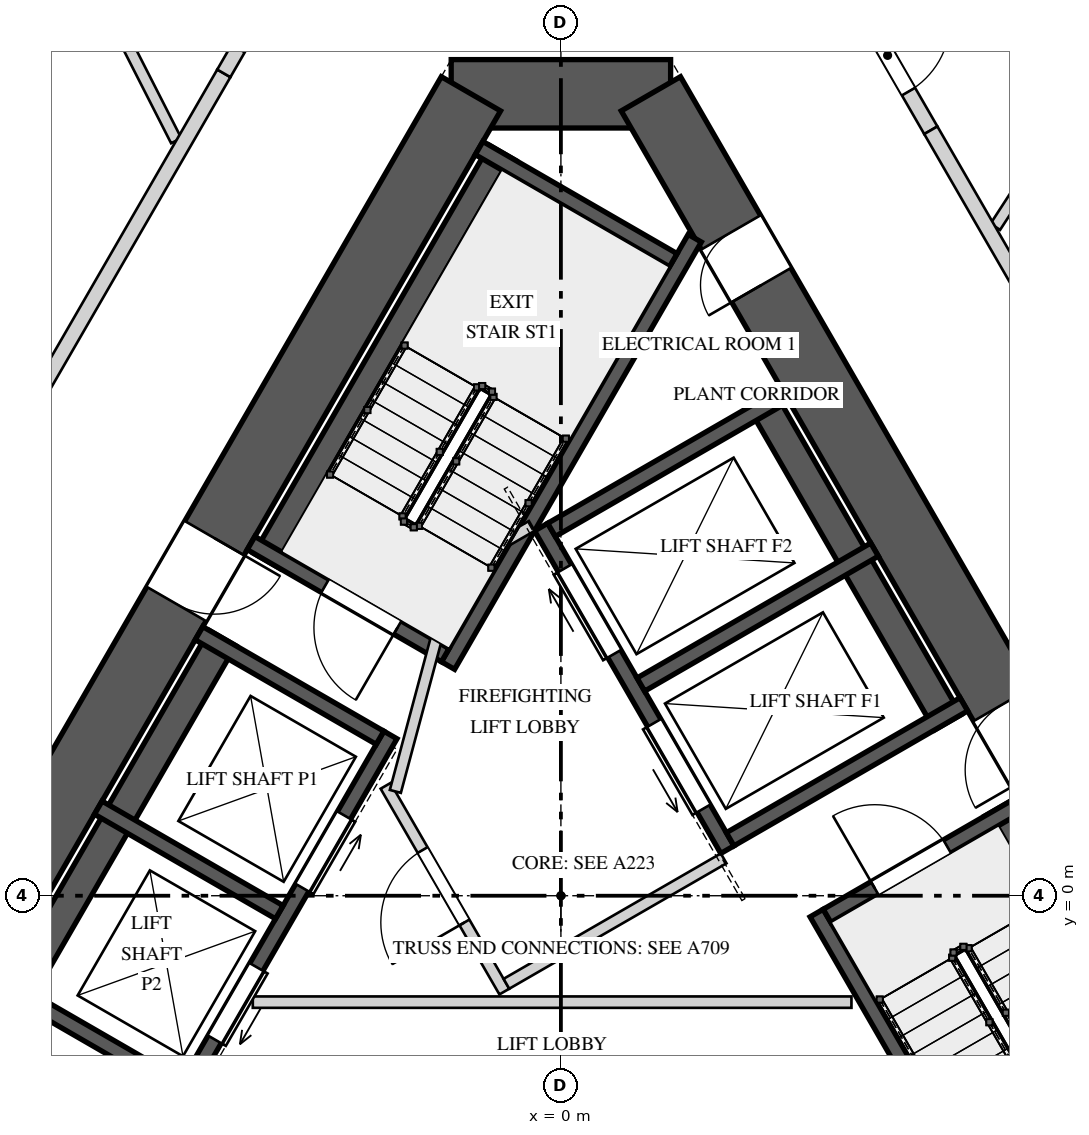
"""IFC4 building model, lengths in metres.
Left out: names, types, materials, properties, quantities, classifications, styles, units other than length and angle.
Written with IfcOpenShell. Run it as: python <this file> out.ifc"""

import sys

from ifc_helpers import new_model, si_unit, direction, frame, frame_2d, origin, place, context, subcontext, project, spatial, polyline, rectangle, outline, extrude, element, fill, save


model = new_model("IFC4")
c1 = context("Model", 3, precision=1e-05, world=origin(), true_north=direction((0.0, 1.0)))
c2 = subcontext(c1, "Body", "Model", "MODEL_VIEW")
j1 = project(units=[si_unit("LENGTHUNIT", "METRE"), si_unit("PLANEANGLEUNIT", "RADIAN")], contexts=[c1])
p1 = place(None, origin())
s1 = spatial("IfcSite", under=j1, at=p1, CompositionType="ELEMENT")
p2 = place(p1, origin())
s2 = spatial("IfcBuilding", under=s1, at=p2, CompositionType="ELEMENT")
p3 = place(p2, frame((0.0, 0.0, 157.6)))
s3 = spatial("IfcBuildingStorey", under=s2, at=p3, CompositionType="ELEMENT", Elevation=157.6)
p4 = place(p3, frame((1.443, 10.55, 0.0), z_axis=(0.0, 0.0, 1.0), x_axis=(-1.0, 0.0, 0.0)))
e1 = element("IfcWall", 1, at=p4, inside=s3, PredefinedType="SHEAR", context=c2, shape_type="SweptSolid", body=[
    extrude(rectangle(XDim=2.887, YDim=0.9, at=frame_2d((1.443, 0.0))), origin(), (0.0, 0.0, 1.0), 5.2),
])
p5 = place(p3, frame((-1.184, 10.55, 0.0), z_axis=(0.0, 0.0, 1.0), x_axis=(-0.500004814304, -0.866022624227, 0.0)))
e2 = element("IfcWall", 2, at=p5, inside=s3, PredefinedType="SHEAR", context=c2, shape_type="SweptSolid", body=[
    extrude(rectangle(XDim=17.09, YDim=0.9, at=frame_2d((8.545, 0.0))), origin(), (0.0, 0.0, 1.0), 5.2),
])
p6 = place(p5, frame((6.75, 0.0, 0.0)))
e3 = element("IfcOpeningElement", 3, at=p6, cuts=e2, PredefinedType="OPENING", context=c2, shape_type="SweptSolid", body=[
    extrude(rectangle(XDim=1.0, YDim=2.4, at=frame_2d((0.5, 1.2))), frame((0.0, 0.46, 0.0), z_axis=(0.0, -1.0, 0.0), x_axis=(1.0, 0.0, 0.0)), (0.0, 0.0, 1.0), 0.92),
])
p7 = place(p3, frame((9.729, -4.25, 0.0), z_axis=(0.0, 0.0, 1.0), x_axis=(-0.500004814304, 0.866022624227, 0.0)))
e4 = element("IfcWall", 4, at=p7, inside=s3, PredefinedType="SHEAR", context=c2, shape_type="SweptSolid", body=[
    extrude(rectangle(XDim=17.09, YDim=0.9, at=frame_2d((8.545, 0.0))), origin(), (0.0, 0.0, 1.0), 5.2),
])
p8 = place(p7, frame((6.82, 0.0, 0.0)))
e5 = element("IfcOpeningElement", 5, at=p8, cuts=e4, PredefinedType="OPENING", context=c2, shape_type="SweptSolid", body=[
    extrude(rectangle(XDim=1.0, YDim=2.4, at=frame_2d((0.5, 1.2))), frame((0.0, 0.46, 0.0), z_axis=(0.0, -1.0, 0.0), x_axis=(1.0, 0.0, 0.0)), (0.0, 0.0, 1.0), 0.92),
])
p9 = place(p7, frame((14.184, 0.0, 0.0)))
e6 = element("IfcOpeningElement", 6, at=p9, cuts=e4, PredefinedType="OPENING", context=c2, shape_type="SweptSolid", body=[
    extrude(rectangle(XDim=0.8, YDim=2.1, at=frame_2d((0.4, 1.05))), frame((0.0, 0.46, 0.0), z_axis=(0.0, -1.0, 0.0), x_axis=(1.0, 0.0, 0.0)), (0.0, 0.0, 1.0), 0.92),
])
p10 = place(p3, frame((-0.766, 9.772, 0.0), z_axis=(0.0, 0.0, 1.0), x_axis=(-0.500009909098, -0.866019682689, 0.0)))
e7 = element("IfcWall", 7, at=p10, inside=s3, PredefinedType="SOLIDWALL", context=c2, shape_type="SweptSolid", body=[
    extrude(rectangle(XDim=6.2, YDim=0.4, at=frame_2d((3.1, 0.0))), origin(), (0.0, 0.0, 1.0), 4.85),
])
p11 = place(p3, frame((1.761, 8.65, 0.0), z_axis=(0.0, 0.0, 1.0), x_axis=(-0.500010023241, -0.866019616786, 0.0)))
e8 = element("IfcWall", 8, at=p11, inside=s3, PredefinedType="SOLIDWALL", context=c2, shape_type="SweptSolid", body=[
    extrude(rectangle(XDim=6.491, YDim=0.2, at=frame_2d((3.246, 0.0))), origin(), (0.0, 0.0, 1.0), 4.85),
])
p12 = place(p3, frame((1.479, 8.361, 0.0), z_axis=(0.0, 0.0, 1.0), x_axis=(-0.866003658127, 0.500037662692, 0.0)))
e9 = element("IfcWall", 9, at=p12, inside=s3, PredefinedType="SOLIDWALL", context=c2, shape_type="SweptSolid", body=[
    extrude(rectangle(XDim=2.95, YDim=0.2, at=frame_2d((1.475, 0.0))), origin(), (0.0, 0.0, 1.0), 4.85),
])
p13 = place(p3, frame((-1.521, 3.165, 0.0), z_axis=(0.0, 0.0, 1.0), x_axis=(-0.866039495442, 0.49997559174, 0.0)))
e10 = element("IfcWall", 10, at=p13, inside=s3, PredefinedType="SOLIDWALL", context=c2, shape_type="SweptSolid", body=[
    extrude(rectangle(XDim=2.95, YDim=0.2, at=frame_2d((1.475, 0.0))), origin(), (0.0, 0.0, 1.0), 4.85),
])
p14 = place(p13, frame((0.725, 0.0, 0.0)))
e11 = element("IfcOpeningElement", 11, at=p14, cuts=e10, PredefinedType="OPENING", context=c2, shape_type="SweptSolid", body=[
    extrude(rectangle(XDim=1.1, YDim=2.4, at=frame_2d((0.55, 1.2))), frame((0.0, 0.11, 0.0), z_axis=(0.0, -1.0, 0.0), x_axis=(1.0, 0.0, 0.0)), (0.0, 0.0, 1.0), 0.22),
])
p15 = place(p3, frame((8.846, -4.222, 0.0), z_axis=(0.0, 0.0, 1.0), x_axis=(-0.500009909098, 0.866019682689, 0.0)))
e12 = element("IfcWall", 12, at=p15, inside=s3, PredefinedType="SOLIDWALL", context=c2, shape_type="SweptSolid", body=[
    extrude(rectangle(XDim=6.2, YDim=0.4, at=frame_2d((3.1, 0.0))), origin(), (0.0, 0.0, 1.0), 4.85),
])
p16 = place(p3, frame((6.611, -5.85, 0.0), z_axis=(0.0, 0.0, 1.0), x_axis=(-0.499965531574, 0.866045303225, 0.0)))
e13 = element("IfcWall", 13, at=p16, inside=s3, PredefinedType="SOLIDWALL", context=c2, shape_type="SweptSolid", body=[
    extrude(rectangle(XDim=6.492, YDim=0.2, at=frame_2d((3.246, 0.0))), origin(), (0.0, 0.0, 1.0), 4.85),
])
p17 = place(p3, frame((3.501, -0.265, 0.0), z_axis=(0.0, 0.0, 1.0), x_axis=(0.866039495442, 0.49997559174, 0.0)))
e14 = element("IfcWall", 14, at=p17, inside=s3, PredefinedType="SOLIDWALL", context=c2, shape_type="SweptSolid", body=[
    extrude(rectangle(XDim=2.95, YDim=0.2, at=frame_2d((1.475, 0.0))), origin(), (0.0, 0.0, 1.0), 4.85),
])
p18 = place(p17, frame((0.725, 0.0, 0.0)))
e15 = element("IfcOpeningElement", 15, at=p18, cuts=e14, PredefinedType="OPENING", context=c2, shape_type="SweptSolid", body=[
    extrude(rectangle(XDim=1.1, YDim=2.4, at=frame_2d((0.55, 1.2))), frame((0.0, 0.11, 0.0), z_axis=(0.0, -1.0, 0.0), x_axis=(1.0, 0.0, 0.0)), (0.0, 0.0, 1.0), 0.22),
])
p19 = place(p3, frame((-2.243, 2.115, 0.0), z_axis=(0.0, 0.0, 1.0), x_axis=(-0.499996545922, -0.866027397988, 0.0)))
e16 = element("IfcWall", 16, at=p19, inside=s3, PredefinedType="SOLIDWALL", context=c2, shape_type="SweptSolid", body=[
    extrude(rectangle(XDim=5.5, YDim=0.2, at=frame_2d((2.75, 0.0))), origin(), (0.0, 0.0, 1.0), 4.85),
])
p20 = place(p19, frame((1.22, 0.0, 0.0)))
e17 = element("IfcOpeningElement", 17, at=p20, cuts=e16, PredefinedType="OPENING", context=c2, shape_type="SweptSolid", body=[
    extrude(rectangle(XDim=1.1, YDim=2.1, at=frame_2d((0.55, 1.05))), frame((0.0, 0.11, 0.0), z_axis=(0.0, -1.0, 0.0), x_axis=(1.0, 0.0, 0.0)), (0.0, 0.0, 1.0), 0.22),
])
p21 = place(p19, frame((3.525, 0.0, 0.0)))
e18 = element("IfcOpeningElement", 18, at=p21, cuts=e16, PredefinedType="OPENING", context=c2, shape_type="SweptSolid", body=[
    extrude(rectangle(XDim=1.1, YDim=2.1, at=frame_2d((0.55, 1.05))), frame((0.0, 0.11, 0.0), z_axis=(0.0, -1.0, 0.0), x_axis=(1.0, 0.0, 0.0)), (0.0, 0.0, 1.0), 0.22),
])
p22 = place(p3, frame((-4.451, 3.39, 0.0), z_axis=(0.0, 0.0, 1.0), x_axis=(-0.499996545922, -0.866027397988, 0.0)))
e19 = element("IfcWall", 19, at=p22, inside=s3, PredefinedType="SOLIDWALL", context=c2, shape_type="SweptSolid", body=[
    extrude(rectangle(XDim=5.5, YDim=0.4, at=frame_2d((2.75, 0.0))), origin(), (0.0, 0.0, 1.0), 4.85),
])
for number, where, z_axis, x_axis in (
    (20, (-2.38, 2.078, 0.0), (0.0, 0.0, 1.0), (-0.866, 0.5, 0.0)),
    (21, (-3.705, -0.217, 0.0), (0.0, 0.0, 1.0), (-0.866, 0.5, 0.0)),
):
    element("IfcWall", number, at=place(p3, frame(where, z_axis=z_axis, x_axis=x_axis)), inside=s3, PredefinedType="SOLIDWALL", context=c2, shape_type="SweptSolid", body=[
        extrude(rectangle(XDim=2.75, YDim=0.2, at=frame_2d((1.375, 0.0))), origin(), (0.0, 0.0, 1.0), 4.85),
    ])
p23 = place(p3, frame((-5.03, -2.512, 0.0), z_axis=(0.0, 0.0, 1.0), x_axis=(-0.866005201286, 0.500034990121, 0.0)))
e22 = element("IfcWall", 22, at=p23, inside=s3, PredefinedType="SOLIDWALL", context=c2, shape_type="SweptSolid", body=[
    extrude(rectangle(XDim=2.75, YDim=0.2, at=frame_2d((1.375, 0.0))), origin(), (0.0, 0.0, 1.0), 4.85),
])
p24 = place(p3, frame((2.19, 0.606, 0.0), z_axis=(0.0, 0.0, 1.0), x_axis=(-0.500002801628, 0.866023786258, 0.0)))
e23 = element("IfcWall", 23, at=p24, inside=s3, PredefinedType="SOLIDWALL", context=c2, shape_type="SweptSolid", body=[
    extrude(rectangle(XDim=4.9, YDim=0.2, at=frame_2d((2.45, 0.0))), origin(), (0.0, 0.0, 1.0), 4.85),
])
p25 = place(p24, frame((0.625, 0.0, 0.0)))
e24 = element("IfcOpeningElement", 24, at=p25, cuts=e23, PredefinedType="OPENING", context=c2, shape_type="SweptSolid", body=[
    extrude(rectangle(XDim=1.3, YDim=2.1, at=frame_2d((0.65, 1.05))), frame((0.0, 0.11, 0.0), z_axis=(0.0, -1.0, 0.0), x_axis=(1.0, 0.0, 0.0)), (0.0, 0.0, 1.0), 0.22),
])
p26 = place(p24, frame((2.975, 0.0, 0.0)))
e25 = element("IfcOpeningElement", 25, at=p26, cuts=e23, PredefinedType="OPENING", context=c2, shape_type="SweptSolid", body=[
    extrude(rectangle(XDim=1.3, YDim=2.1, at=frame_2d((0.65, 1.05))), frame((0.0, 0.11, 0.0), z_axis=(0.0, -1.0, 0.0), x_axis=(1.0, 0.0, 0.0)), (0.0, 0.0, 1.0), 0.22),
])
p27 = place(p3, frame((5.092, 2.281, 0.0), z_axis=(0.0, 0.0, 1.0), x_axis=(-0.500018594424, 0.866014668023, 0.0)))
e26 = element("IfcWall", 26, at=p27, inside=s3, PredefinedType="SOLIDWALL", context=c2, shape_type="SweptSolid", body=[
    extrude(rectangle(XDim=4.9, YDim=0.4, at=frame_2d((2.45, 0.0))), origin(), (0.0, 0.0, 1.0), 4.85),
])
for number, where, z_axis, x_axis in (
    (27, (2.227, 0.743, 0.0), (0.0, 0.0, 1.0), (0.866, 0.5, 0.0)),
    (28, (1.052, 2.778, 0.0), (0.0, 0.0, 1.0), (0.866, 0.5, 0.0)),
):
    element("IfcWall", number, at=place(p3, frame(where, z_axis=z_axis, x_axis=x_axis)), inside=s3, PredefinedType="SOLIDWALL", context=c2, shape_type="SweptSolid", body=[
        extrude(rectangle(XDim=3.55, YDim=0.2, at=frame_2d((1.775, 0.0))), origin(), (0.0, 0.0, 1.0), 4.85),
    ])
p28 = place(p3, frame((-0.123, 4.813, 0.0), z_axis=(0.0, 0.0, 1.0), x_axis=(0.865995461329, 0.500051858269, 0.0)))
e29 = element("IfcWall", 29, at=p28, inside=s3, PredefinedType="SOLIDWALL", context=c2, shape_type="SweptSolid", body=[
    extrude(rectangle(XDim=3.55, YDim=0.2, at=frame_2d((1.775, 0.0))), origin(), (0.0, 0.0, 1.0), 4.85),
])
p29 = place(p3, frame((-0.744, -1.261, 0.0), z_axis=(0.0, 0.0, 1.0), x_axis=(-0.500004234368, 0.866022959057, 0.0)))
e30 = element("IfcWall", 30, at=p29, inside=s3, PredefinedType="PARTITIONING", context=c2, shape_type="SweptSolid", body=[
    extrude(rectangle(XDim=3.125, YDim=0.15, at=frame_2d((1.562, 0.0))), origin(), (0.0, 0.0, 1.0), 4.85),
])
p30 = place(p29, frame((1.05, 0.0, 0.0)))
e31 = element("IfcOpeningElement", 31, at=p30, cuts=e30, PredefinedType="OPENING", context=c2, shape_type="SweptSolid", body=[
    extrude(rectangle(XDim=1.1, YDim=2.4, at=frame_2d((0.55, 1.2))), frame((0.0, 0.085, 0.0), z_axis=(0.0, -1.0, 0.0), x_axis=(1.0, 0.0, 0.0)), (0.0, 0.0, 1.0), 0.17),
])
p31 = place(p3, frame((-0.717, -1.159, 0.0), z_axis=(0.0, 0.0, 1.0), x_axis=(0.866008176907, 0.50002983664, 0.0)))
e32 = element("IfcWall", 32, at=p31, inside=s3, PredefinedType="PARTITIONING", context=c2, shape_type="SweptSolid", body=[
    extrude(rectangle(XDim=3.3, YDim=0.15, at=frame_2d((1.65, 0.0))), origin(), (0.0, 0.0, 1.0), 4.85),
])
p32 = place(p3, frame((-2.178, 1.372, 0.0), z_axis=(0.0, 0.0, 1.0), x_axis=(0.258808958833, 0.96592852884, 0.0)))
e33 = element("IfcWall", 33, at=p32, inside=s3, PredefinedType="PARTITIONING", context=c2, shape_type="SweptSolid", body=[
    extrude(rectangle(XDim=2.903, YDim=0.15, at=frame_2d((1.451, 0.0))), origin(), (0.0, 0.0, 1.0), 4.85),
])
p33 = place(p3, frame((-1.51, 4.215, 0.0), z_axis=(0.0, 0.0, 1.0), x_axis=(0.866085525409, 0.49989585183, 0.0)))
e34 = element("IfcWall", 34, at=p33, inside=s3, PredefinedType="PARTITIONING", context=c2, shape_type="SweptSolid", body=[
    extrude(rectangle(XDim=1.3, YDim=0.15, at=frame_2d((0.65, 0.0))), origin(), (0.0, 0.0, 1.0), 4.85),
])
p34 = place(p3, frame((-4.053, -1.4, 0.0), z_axis=(0.0, 0.0, 1.0), x_axis=(1.0, 0.0, 0.0)))
e35 = element("IfcWall", 35, at=p34, inside=s3, PredefinedType="PARTITIONING", context=c2, shape_type="SweptSolid", body=[
    extrude(rectangle(XDim=7.876, YDim=0.15, at=frame_2d((3.938, 0.0))), origin(), (0.0, 0.0, 1.0), 4.85),
])
p35 = place(p3, frame((-5.061, 9.934, 0.0), z_axis=(0.0, 0.0, 1.0), x_axis=(-0.453998628556, 0.891002382303, 0.0)))
e36 = element("IfcWall", 36, at=p35, inside=s3, PredefinedType="PARTITIONING", context=c2, shape_type="SweptSolid", body=[
    extrude(rectangle(XDim=9.539, YDim=0.15, at=frame_2d((4.77, 0.0))), origin(), (0.0, 0.0, 1.0), 4.85),
])
p36 = place(p3, frame((8.987, 13.838, 0.0), z_axis=(0.0, 0.0, 1.0), x_axis=(-0.544632548775, -0.838674780123, 0.0)))
e37 = element("IfcWall", 37, at=p36, inside=s3, PredefinedType="PARTITIONING", context=c2, shape_type="SweptSolid", body=[
    extrude(rectangle(XDim=6.006, YDim=0.15, at=frame_2d((3.003, 0.0))), origin(), (0.0, 0.0, 1.0), 4.85),
])
p37 = place(p3, frame((3.998, 11.575, 0.0), z_axis=(0.0, 0.0, 1.0), x_axis=(0.500038750527, -0.866003030001, 0.0)))
e38 = element("IfcWall", 38, at=p37, inside=s3, PredefinedType="SOLIDWALL", context=c2, shape_type="SweptSolid", body=[
    extrude(outline(polyline([(0.0, 0.0), (1.737, 0.0), (1.737, 4.15), (0.872, 4.15), (0.872, 4.85), (0.0, 4.85), (0.0, 0.0)])), frame((0.0, 0.1, 0.0), z_axis=(0.0, -1.0, 0.0), x_axis=(1.0, 0.0, 0.0)), (0.0, 0.0, 1.0), 0.2),
])
p38 = place(p37, frame((0.05, 0.0, 0.0)))
e39 = element("IfcOpeningElement", 39, at=p38, cuts=e38, PredefinedType="OPENING", context=c2, shape_type="SweptSolid", body=[
    extrude(rectangle(XDim=1.1, YDim=2.2, at=frame_2d((0.55, 1.1))), frame((0.0, 0.11, 0.0), z_axis=(0.0, -1.0, 0.0), x_axis=(1.0, 0.0, 0.0)), (0.0, 0.0, 1.0), 0.22),
])
p39 = place(p3, frame((4.867, 10.071, 0.0), z_axis=(0.0, 0.0, 1.0), x_axis=(0.50003588878, -0.866004682396, 0.0)))
e40 = element("IfcWall", 40, at=p39, inside=s3, PredefinedType="SOLIDWALL", context=c2, shape_type="SweptSolid", body=[
    extrude(rectangle(XDim=3.551, YDim=0.2, at=frame_2d((1.775, 0.0))), origin(), (0.0, 0.0, 1.0), 4.85),
])
p40 = place(p3, frame((-7.106, 6.191, 0.0), z_axis=(0.0, 0.0, 1.0), x_axis=(0.500011158634, 0.866018961248, 0.0)))
e41 = element("IfcWall", 41, at=p40, inside=s3, PredefinedType="SOLIDWALL", context=c2, shape_type="SweptSolid", body=[
    extrude(rectangle(XDim=5.344, YDim=0.2, at=frame_2d((2.672, 0.0))), origin(), (0.0, 0.0, 1.0), 4.85),
])
p41 = place(p3, frame((-4.435, 10.819, 0.0), z_axis=(0.0, 0.0, 1.0), x_axis=(0.500008507724, 0.866020491792, 0.0)))
e42 = element("IfcWall", 42, at=p41, inside=s3, PredefinedType="SOLIDWALL", context=c2, shape_type="SweptSolid", body=[
    extrude(outline(polyline([(0.0, 0.0), (1.527, 0.0), (1.527, 4.85), (1.039, 4.85), (1.039, 3.95), (0.0, 3.95), (0.0, 0.0)])), frame((0.0, 0.1, 0.0), z_axis=(0.0, -1.0, 0.0), x_axis=(1.0, 0.0, 0.0)), (0.0, 0.0, 1.0), 0.2),
])
p42 = place(p41, frame((0.377, 0.0, 0.0)))
e43 = element("IfcOpeningElement", 43, at=p42, cuts=e42, PredefinedType="OPENING", context=c2, shape_type="SweptSolid", body=[
    extrude(rectangle(XDim=1.1, YDim=2.2, at=frame_2d((0.55, 1.1))), frame((0.0, 0.11, 0.0), z_axis=(0.0, -1.0, 0.0), x_axis=(1.0, 0.0, 0.0)), (0.0, 0.0, 1.0), 0.22),
])
p43 = place(p14, origin())
e44 = element("IfcDoor", 44, at=p43, inside=s3, OperationType="SINGLE_SWING_RIGHT", PredefinedType="DOOR", context=c2, shape_type="SweptSolid", body=[
    extrude(rectangle(XDim=1.1, YDim=2.4, at=frame_2d((0.55, 1.2))), frame((0.0, 0.025, 0.0), z_axis=(0.0, -1.0, 0.0), x_axis=(1.0, 0.0, 0.0)), (0.0, 0.0, 1.0), 0.05),
])
fill(e11, e44)
p44 = place(p18, origin())
e45 = element("IfcDoor", 45, at=p44, inside=s3, OperationType="SINGLE_SWING_RIGHT", PredefinedType="DOOR", context=c2, shape_type="SweptSolid", body=[
    extrude(rectangle(XDim=1.1, YDim=2.4, at=frame_2d((0.55, 1.2))), frame((0.0, 0.025, 0.0), z_axis=(0.0, -1.0, 0.0), x_axis=(1.0, 0.0, 0.0)), (0.0, 0.0, 1.0), 0.05),
])
fill(e15, e45)
p45 = place(p20, origin())
e46 = element("IfcDoor", 46, at=p45, inside=s3, OperationType="SLIDING_TO_LEFT", PredefinedType="DOOR", context=c2, shape_type="SweptSolid", body=[
    extrude(rectangle(XDim=1.1, YDim=2.1, at=frame_2d((0.55, 1.05))), frame((0.0, 0.025, 0.0), z_axis=(0.0, -1.0, 0.0), x_axis=(1.0, 0.0, 0.0)), (0.0, 0.0, 1.0), 0.05),
])
fill(e17, e46)
p46 = place(p21, origin())
e47 = element("IfcDoor", 47, at=p46, inside=s3, OperationType="SLIDING_TO_RIGHT", PredefinedType="DOOR", context=c2, shape_type="SweptSolid", body=[
    extrude(rectangle(XDim=1.1, YDim=2.1, at=frame_2d((0.55, 1.05))), frame((0.0, 0.025, 0.0), z_axis=(0.0, -1.0, 0.0), x_axis=(1.0, 0.0, 0.0)), (0.0, 0.0, 1.0), 0.05),
])
fill(e18, e47)
p47 = place(p25, origin())
e48 = element("IfcDoor", 48, at=p47, inside=s3, OperationType="SLIDING_TO_LEFT", PredefinedType="DOOR", context=c2, shape_type="SweptSolid", body=[
    extrude(rectangle(XDim=1.3, YDim=2.1, at=frame_2d((0.65, 1.05))), frame((0.0, 0.025, 0.0), z_axis=(0.0, -1.0, 0.0), x_axis=(1.0, 0.0, 0.0)), (0.0, 0.0, 1.0), 0.05),
])
fill(e24, e48)
p48 = place(p26, origin())
e49 = element("IfcDoor", 49, at=p48, inside=s3, OperationType="SLIDING_TO_RIGHT", PredefinedType="DOOR", context=c2, shape_type="SweptSolid", body=[
    extrude(rectangle(XDim=1.3, YDim=2.1, at=frame_2d((0.65, 1.05))), frame((0.0, 0.025, 0.0), z_axis=(0.0, -1.0, 0.0), x_axis=(1.0, 0.0, 0.0)), (0.0, 0.0, 1.0), 0.05),
])
fill(e25, e49)
p49 = place(p30, origin())
e50 = element("IfcDoor", 50, at=p49, inside=s3, OperationType="SINGLE_SWING_LEFT", PredefinedType="DOOR", context=c2, shape_type="SweptSolid", body=[
    extrude(rectangle(XDim=1.1, YDim=2.4, at=frame_2d((0.55, 1.2))), frame((0.0, 0.025, 0.0), z_axis=(0.0, -1.0, 0.0), x_axis=(1.0, 0.0, 0.0)), (0.0, 0.0, 1.0), 0.05),
])
fill(e31, e50)
p50 = place(p6, origin())
e51 = element("IfcDoor", 51, at=p50, inside=s3, OperationType="SINGLE_SWING_RIGHT", PredefinedType="DOOR", context=c2, shape_type="SweptSolid", body=[
    extrude(rectangle(XDim=1.0, YDim=2.4, at=frame_2d((0.5, 1.2))), frame((0.0, 0.025, 0.0), z_axis=(0.0, -1.0, 0.0), x_axis=(1.0, 0.0, 0.0)), (0.0, 0.0, 1.0), 0.05),
])
fill(e3, e51)
p51 = place(p8, origin())
e52 = element("IfcDoor", 52, at=p51, inside=s3, OperationType="SINGLE_SWING_RIGHT", PredefinedType="DOOR", context=c2, shape_type="SweptSolid", body=[
    extrude(rectangle(XDim=1.0, YDim=2.4, at=frame_2d((0.5, 1.2))), frame((0.0, 0.025, 0.0), z_axis=(0.0, -1.0, 0.0), x_axis=(1.0, 0.0, 0.0)), (0.0, 0.0, 1.0), 0.05),
])
fill(e5, e52)
p52 = place(p9, origin())
e53 = element("IfcDoor", 53, at=p52, inside=s3, OperationType="SINGLE_SWING_RIGHT", PredefinedType="DOOR", context=c2, shape_type="SweptSolid", body=[
    extrude(rectangle(XDim=0.8, YDim=2.1, at=frame_2d((0.4, 1.05))), frame((0.0, 0.025, 0.0), z_axis=(0.0, -1.0, 0.0), x_axis=(1.0, 0.0, 0.0)), (0.0, 0.0, 1.0), 0.05),
])
fill(e6, e53)
p53 = place(p38, origin())
e54 = element("IfcDoor", 54, at=p53, inside=s3, OperationType="SINGLE_SWING_LEFT", PredefinedType="DOOR", context=c2, shape_type="SweptSolid", body=[
    extrude(rectangle(XDim=1.1, YDim=2.2, at=frame_2d((0.55, 1.1))), frame((0.0, 0.025, 0.0), z_axis=(0.0, -1.0, 0.0), x_axis=(1.0, 0.0, 0.0)), (0.0, 0.0, 1.0), 0.05),
])
fill(e39, e54)
save(model, sys.argv[1])
